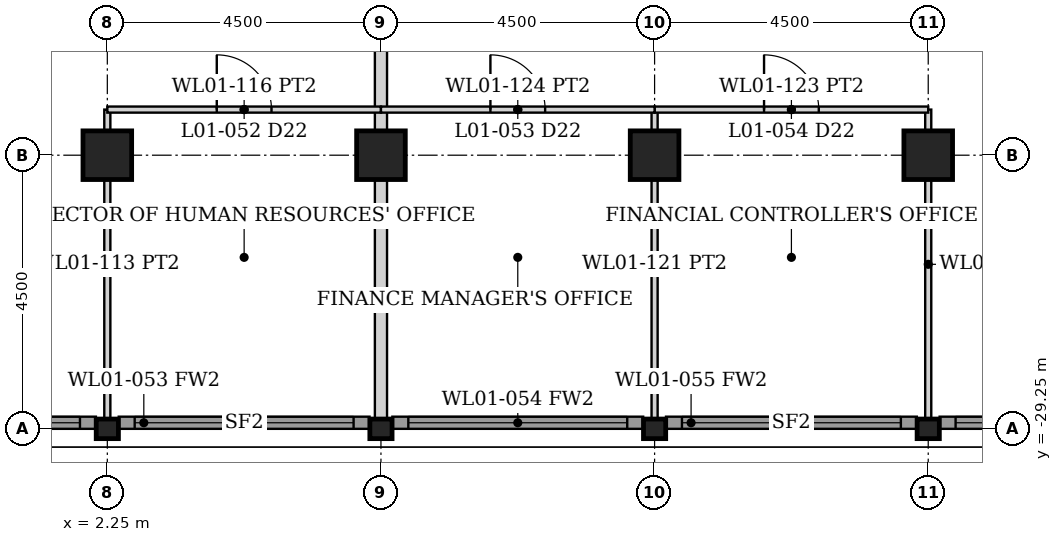
"""IFC4 building model, lengths in metres.
Left out: names, types, materials, properties, quantities, classifications, styles, units other than length and angle.
Written with IfcOpenShell. Run it as: python <this file> out.ifc"""

import sys

from ifc_helpers import new_model, si_unit, direction, frame, frame_2d, origin, origin_2d, place, context, subcontext, project, spatial, rectangle, hollow_rectangle, i_section, extrude, element, fill, save


model = new_model("IFC4")
c1 = context("Model", 3, precision=1e-05, world=origin(), true_north=direction((0.0, 1.0)))
c2 = subcontext(c1, "Body", "Model", "MODEL_VIEW")
j1 = project(units=[si_unit("LENGTHUNIT", "METRE"), si_unit("PLANEANGLEUNIT", "RADIAN")], contexts=[c1])
p1 = place(None, origin())
s1 = spatial("IfcSite", under=j1, at=p1, CompositionType="ELEMENT")
p2 = place(p1, origin())
s2 = spatial("IfcBuilding", under=s1, at=p2, CompositionType="ELEMENT")
p3 = place(p2, frame((0.0, 0.0, 6.0)))
s3 = spatial("IfcBuildingStorey", under=s2, at=p3, CompositionType="ELEMENT", Elevation=6.0)
for number, where, z_axis, x_axis in (
    (1, (2.25, -24.75, 0.0), (0.0, 0.0, 1.0), (0.0, 1.0, 0.0)),
    (2, (6.75, -24.75, 0.0), (0.0, 0.0, 1.0), (0.0, 1.0, 0.0)),
    (3, (11.25, -24.75, 0.0), (0.0, 0.0, 1.0), (0.0, 1.0, 0.0)),
    (4, (15.75, -24.75, 0.0), (0.0, 0.0, 1.0), (0.0, 1.0, 0.0)),
):
    element("IfcColumn", number, at=place(p3, frame(where, z_axis=z_axis, x_axis=x_axis)), inside=s3, PredefinedType="COLUMN", context=c2, shape_type="SweptSolid", body=[
        extrude(hollow_rectangle(XDim=0.8, YDim=0.8, WallThickness=0.08, at=origin_2d()), origin(), (0.0, 0.0, 1.0), 5.0),
    ])
for number, where, z_axis, x_axis in (
    (5, (2.25, -29.25, 0.0), (0.0, 0.0, 1.0), (0.0, 1.0, 0.0)),
    (6, (6.75, -29.25, 0.0), (0.0, 0.0, 1.0), (0.0, 1.0, 0.0)),
    (7, (11.25, -29.25, 0.0), (0.0, 0.0, 1.0), (0.0, 1.0, 0.0)),
    (8, (15.75, -29.25, 0.0), (0.0, 0.0, 1.0), (0.0, 1.0, 0.0)),
):
    element("IfcColumn", number, at=place(p3, frame(where, z_axis=z_axis, x_axis=x_axis)), inside=s3, PredefinedType="COLUMN", context=c2, shape_type="SweptSolid", body=[
        extrude(i_section(OverallWidth=0.322, OverallDepth=0.365, WebThickness=0.027, FlangeThickness=0.044, FilletRadius=0.015, at=origin_2d()), origin(), (0.0, 0.0, 1.0), 5.0),
    ])
p4 = place(p3, frame((-2.062, -29.15, 0.0), z_axis=(0.0, 0.0, 1.0), x_axis=(1.0, 0.0, 0.0)))
e9 = element("IfcWall", 9, at=p4, inside=s3, PredefinedType="SOLIDWALL", context=c2, shape_type="SweptSolid", body=[
    extrude(rectangle(XDim=4.125, YDim=0.2, at=frame_2d((2.062, 0.0))), origin(), (0.0, 0.0, 1.0), 4.133),
])
p5 = place(p4, frame((0.262, 0.0, 0.15)))
e10 = element("IfcOpeningElement", 10, at=p5, cuts=e9, PredefinedType="OPENING", context=c2, shape_type="SweptSolid", body=[
    extrude(rectangle(XDim=3.6, YDim=3.833, at=frame_2d((1.8, 1.917))), frame((0.0, 0.11, 0.0), z_axis=(0.0, -1.0, 0.0), x_axis=(1.0, 0.0, 0.0)), (0.0, 0.0, 1.0), 0.22),
])
p6 = place(p3, frame((2.438, -29.15, 0.0), z_axis=(0.0, 0.0, 1.0), x_axis=(1.0, 0.0, 0.0)))
e11 = element("IfcWall", 11, at=p6, inside=s3, PredefinedType="SOLIDWALL", context=c2, shape_type="SweptSolid", body=[
    extrude(rectangle(XDim=4.125, YDim=0.2, at=frame_2d((2.062, 0.0))), origin(), (0.0, 0.0, 1.0), 4.133),
])
p7 = place(p6, frame((0.262, 0.0, 0.15)))
e12 = element("IfcOpeningElement", 12, at=p7, cuts=e11, PredefinedType="OPENING", context=c2, shape_type="SweptSolid", body=[
    extrude(rectangle(XDim=3.6, YDim=3.833, at=frame_2d((1.8, 1.917))), frame((0.0, 0.11, 0.0), z_axis=(0.0, -1.0, 0.0), x_axis=(1.0, 0.0, 0.0)), (0.0, 0.0, 1.0), 0.22),
])
p8 = place(p3, frame((6.938, -29.15, 0.0), z_axis=(0.0, 0.0, 1.0), x_axis=(1.0, 0.0, 0.0)))
e13 = element("IfcWall", 13, at=p8, inside=s3, PredefinedType="SOLIDWALL", context=c2, shape_type="SweptSolid", body=[
    extrude(rectangle(XDim=4.125, YDim=0.2, at=frame_2d((2.062, 0.0))), origin(), (0.0, 0.0, 1.0), 4.133),
])
p9 = place(p8, frame((0.262, 0.0, 0.15)))
e14 = element("IfcOpeningElement", 14, at=p9, cuts=e13, PredefinedType="OPENING", context=c2, shape_type="SweptSolid", body=[
    extrude(rectangle(XDim=3.6, YDim=3.833, at=frame_2d((1.8, 1.917))), frame((0.0, 0.11, 0.0), z_axis=(0.0, -1.0, 0.0), x_axis=(1.0, 0.0, 0.0)), (0.0, 0.0, 1.0), 0.22),
])
p10 = place(p3, frame((11.438, -29.15, 0.0), z_axis=(0.0, 0.0, 1.0), x_axis=(1.0, 0.0, 0.0)))
e15 = element("IfcWall", 15, at=p10, inside=s3, PredefinedType="SOLIDWALL", context=c2, shape_type="SweptSolid", body=[
    extrude(rectangle(XDim=4.125, YDim=0.2, at=frame_2d((2.062, 0.0))), origin(), (0.0, 0.0, 1.0), 4.133),
])
p11 = place(p10, frame((0.262, 0.0, 0.15)))
e16 = element("IfcOpeningElement", 16, at=p11, cuts=e15, PredefinedType="OPENING", context=c2, shape_type="SweptSolid", body=[
    extrude(rectangle(XDim=3.6, YDim=3.833, at=frame_2d((1.8, 1.917))), frame((0.0, 0.11, 0.0), z_axis=(0.0, -1.0, 0.0), x_axis=(1.0, 0.0, 0.0)), (0.0, 0.0, 1.0), 0.22),
])
p12 = place(p3, frame((15.938, -29.15, 0.0), z_axis=(0.0, 0.0, 1.0), x_axis=(1.0, 0.0, 0.0)))
e17 = element("IfcWall", 17, at=p12, inside=s3, PredefinedType="SOLIDWALL", context=c2, shape_type="SweptSolid", body=[
    extrude(rectangle(XDim=4.125, YDim=0.2, at=frame_2d((2.062, 0.0))), origin(), (0.0, 0.0, 1.0), 4.133),
])
p13 = place(p12, frame((0.262, 0.0, 0.15)))
e18 = element("IfcOpeningElement", 18, at=p13, cuts=e17, PredefinedType="OPENING", context=c2, shape_type="SweptSolid", body=[
    extrude(rectangle(XDim=3.6, YDim=3.833, at=frame_2d((1.8, 1.917))), frame((0.0, 0.11, 0.0), z_axis=(0.0, -1.0, 0.0), x_axis=(1.0, 0.0, 0.0)), (0.0, 0.0, 1.0), 0.22),
])
p14 = place(p3, frame((6.75, -29.089, 0.0), z_axis=(0.0, 0.0, 1.0), x_axis=(0.0, 1.0, 0.0)))
e19 = element("IfcWall", 19, at=p14, inside=s3, PredefinedType="PARTITIONING", context=c2, shape_type="SweptSolid", body=[
    extrude(rectangle(XDim=19.889, YDim=0.2, at=frame_2d((9.944, 0.0))), origin(), (0.0, 0.0, 1.0), 3.829),
])
p15 = place(p3, frame((2.25, -29.089, 0.0), z_axis=(0.0, 0.0, 1.0), x_axis=(0.0, 1.0, 0.0)))
e20 = element("IfcWall", 20, at=p15, inside=s3, PredefinedType="PARTITIONING", context=c2, shape_type="SweptSolid", body=[
    extrude(rectangle(XDim=5.089, YDim=0.1, at=frame_2d((2.544, 0.0))), origin(), (0.0, 0.0, 1.0), 3.829),
])
p16 = place(p3, frame((2.25, -24.0, 0.0), z_axis=(0.0, 0.0, 1.0), x_axis=(1.0, 0.0, 0.0)))
e21 = element("IfcWall", 21, at=p16, inside=s3, PredefinedType="PARTITIONING", context=c2, shape_type="SweptSolid", body=[
    extrude(rectangle(XDim=4.5, YDim=0.1, at=frame_2d((2.25, 0.0))), origin(), (0.0, 0.0, 1.0), 3.829),
])
p17 = place(p16, frame((1.8, 0.0, 0.0)))
e22 = element("IfcOpeningElement", 22, at=p17, cuts=e21, PredefinedType="OPENING", context=c2, shape_type="SweptSolid", body=[
    extrude(rectangle(XDim=0.9, YDim=2.1, at=frame_2d((0.45, 1.05))), frame((0.0, 0.06, 0.0), z_axis=(0.0, -1.0, 0.0), x_axis=(1.0, 0.0, 0.0)), (0.0, 0.0, 1.0), 0.12),
])
for number, where, z_axis, x_axis in (
    (23, (11.25, -29.089, 0.0), (0.0, 0.0, 1.0), (0.0, 1.0, 0.0)),
    (24, (15.75, -29.089, 0.0), (0.0, 0.0, 1.0), (0.0, 1.0, 0.0)),
):
    element("IfcWall", number, at=place(p3, frame(where, z_axis=z_axis, x_axis=x_axis)), inside=s3, PredefinedType="PARTITIONING", context=c2, shape_type="SweptSolid", body=[
        extrude(rectangle(XDim=5.089, YDim=0.1, at=frame_2d((2.544, 0.0))), origin(), (0.0, 0.0, 1.0), 3.829),
    ])
p18 = place(p3, frame((11.25, -24.0, 0.0), z_axis=(0.0, 0.0, 1.0), x_axis=(1.0, 0.0, 0.0)))
e25 = element("IfcWall", 25, at=p18, inside=s3, PredefinedType="PARTITIONING", context=c2, shape_type="SweptSolid", body=[
    extrude(rectangle(XDim=4.5, YDim=0.1, at=frame_2d((2.25, 0.0))), origin(), (0.0, 0.0, 1.0), 3.829),
])
p19 = place(p18, frame((1.8, 0.0, 0.0)))
e26 = element("IfcOpeningElement", 26, at=p19, cuts=e25, PredefinedType="OPENING", context=c2, shape_type="SweptSolid", body=[
    extrude(rectangle(XDim=0.9, YDim=2.1, at=frame_2d((0.45, 1.05))), frame((0.0, 0.06, 0.0), z_axis=(0.0, -1.0, 0.0), x_axis=(1.0, 0.0, 0.0)), (0.0, 0.0, 1.0), 0.12),
])
p20 = place(p3, frame((6.75, -24.0, 0.0), z_axis=(0.0, 0.0, 1.0), x_axis=(1.0, 0.0, 0.0)))
e27 = element("IfcWall", 27, at=p20, inside=s3, PredefinedType="PARTITIONING", context=c2, shape_type="SweptSolid", body=[
    extrude(rectangle(XDim=4.5, YDim=0.1, at=frame_2d((2.25, 0.0))), origin(), (0.0, 0.0, 1.0), 3.829),
])
p21 = place(p20, frame((1.8, 0.0, 0.0)))
e28 = element("IfcOpeningElement", 28, at=p21, cuts=e27, PredefinedType="OPENING", context=c2, shape_type="SweptSolid", body=[
    extrude(rectangle(XDim=0.9, YDim=2.1, at=frame_2d((0.45, 1.05))), frame((0.0, 0.06, 0.0), z_axis=(0.0, -1.0, 0.0), x_axis=(1.0, 0.0, 0.0)), (0.0, 0.0, 1.0), 0.12),
])
p22 = place(p5, origin())
e29 = element("IfcWindow", 29, at=p22, inside=s3, PartitioningType="SINGLE_PANEL", PredefinedType="WINDOW", context=c2, shape_type="SweptSolid", body=[
    extrude(rectangle(XDim=3.6, YDim=3.833, at=frame_2d((1.8, 1.917))), frame((0.0, 0.03, 0.0), z_axis=(0.0, -1.0, 0.0), x_axis=(1.0, 0.0, 0.0)), (0.0, 0.0, 1.0), 0.06),
])
fill(e10, e29)
p23 = place(p7, origin())
e30 = element("IfcWindow", 30, at=p23, inside=s3, PartitioningType="SINGLE_PANEL", PredefinedType="WINDOW", context=c2, shape_type="SweptSolid", body=[
    extrude(rectangle(XDim=3.6, YDim=3.833, at=frame_2d((1.8, 1.917))), frame((0.0, 0.03, 0.0), z_axis=(0.0, -1.0, 0.0), x_axis=(1.0, 0.0, 0.0)), (0.0, 0.0, 1.0), 0.06),
])
fill(e12, e30)
p24 = place(p9, origin())
e31 = element("IfcWindow", 31, at=p24, inside=s3, PartitioningType="SINGLE_PANEL", PredefinedType="WINDOW", context=c2, shape_type="SweptSolid", body=[
    extrude(rectangle(XDim=3.6, YDim=3.833, at=frame_2d((1.8, 1.917))), frame((0.0, 0.03, 0.0), z_axis=(0.0, -1.0, 0.0), x_axis=(1.0, 0.0, 0.0)), (0.0, 0.0, 1.0), 0.06),
])
fill(e14, e31)
p25 = place(p11, origin())
e32 = element("IfcWindow", 32, at=p25, inside=s3, PartitioningType="SINGLE_PANEL", PredefinedType="WINDOW", context=c2, shape_type="SweptSolid", body=[
    extrude(rectangle(XDim=3.6, YDim=3.833, at=frame_2d((1.8, 1.917))), frame((0.0, 0.03, 0.0), z_axis=(0.0, -1.0, 0.0), x_axis=(1.0, 0.0, 0.0)), (0.0, 0.0, 1.0), 0.06),
])
fill(e16, e32)
p26 = place(p13, origin())
e33 = element("IfcWindow", 33, at=p26, inside=s3, PartitioningType="SINGLE_PANEL", PredefinedType="WINDOW", context=c2, shape_type="SweptSolid", body=[
    extrude(rectangle(XDim=3.6, YDim=3.833, at=frame_2d((1.8, 1.917))), frame((0.0, 0.03, 0.0), z_axis=(0.0, -1.0, 0.0), x_axis=(1.0, 0.0, 0.0)), (0.0, 0.0, 1.0), 0.06),
])
fill(e18, e33)
p27 = place(p17, origin())
e34 = element("IfcDoor", 34, at=p27, inside=s3, OperationType="SINGLE_SWING_LEFT", PredefinedType="DOOR", context=c2, shape_type="SweptSolid", body=[
    extrude(rectangle(XDim=0.9, YDim=2.1, at=frame_2d((0.45, 1.05))), frame((0.0, 0.025, 0.0), z_axis=(0.0, -1.0, 0.0), x_axis=(1.0, 0.0, 0.0)), (0.0, 0.0, 1.0), 0.05),
])
fill(e22, e34)
p28 = place(p19, origin())
e35 = element("IfcDoor", 35, at=p28, inside=s3, OperationType="SINGLE_SWING_LEFT", PredefinedType="DOOR", context=c2, shape_type="SweptSolid", body=[
    extrude(rectangle(XDim=0.9, YDim=2.1, at=frame_2d((0.45, 1.05))), frame((0.0, 0.025, 0.0), z_axis=(0.0, -1.0, 0.0), x_axis=(1.0, 0.0, 0.0)), (0.0, 0.0, 1.0), 0.05),
])
fill(e26, e35)
p29 = place(p21, origin())
e36 = element("IfcDoor", 36, at=p29, inside=s3, OperationType="SINGLE_SWING_LEFT", PredefinedType="DOOR", context=c2, shape_type="SweptSolid", body=[
    extrude(rectangle(XDim=0.9, YDim=2.1, at=frame_2d((0.45, 1.05))), frame((0.0, 0.025, 0.0), z_axis=(0.0, -1.0, 0.0), x_axis=(1.0, 0.0, 0.0)), (0.0, 0.0, 1.0), 0.05),
])
fill(e28, e36)
save(model, sys.argv[1])
